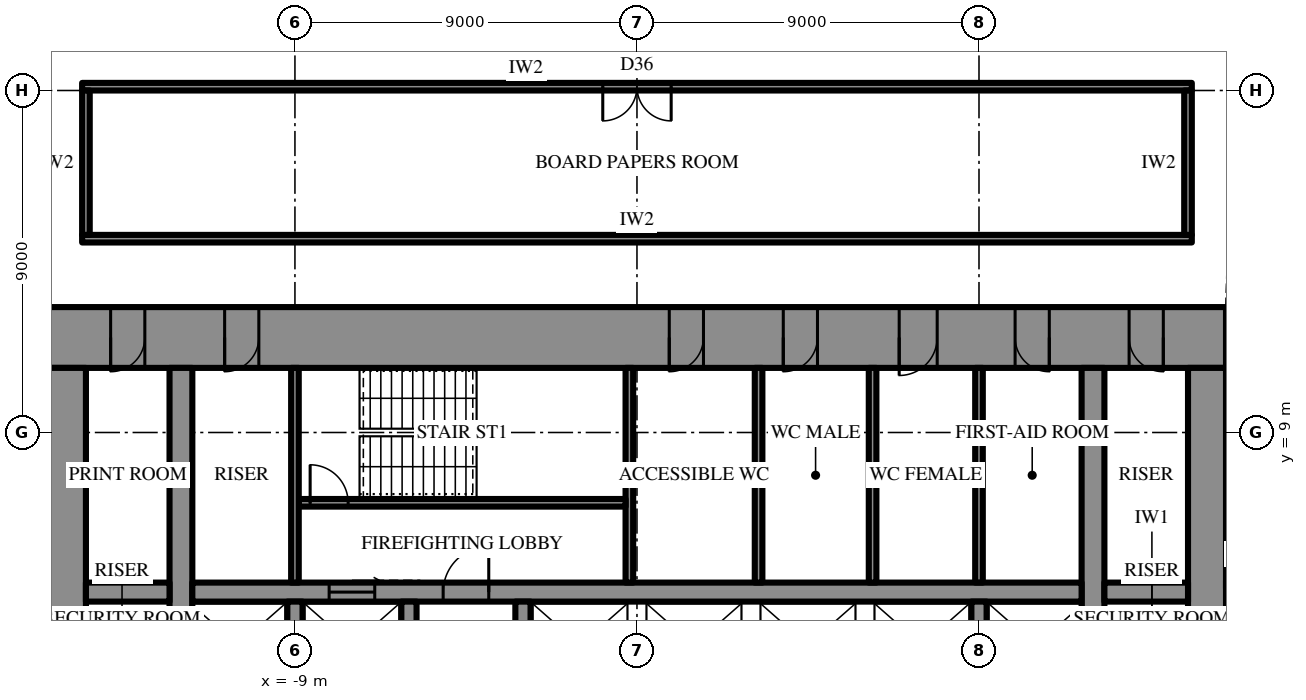
"""IFC4 building model, lengths in metres.
Left out: names, types, materials, properties, quantities, classifications, styles, units other than length and angle.
Written with IfcOpenShell. Run it as: python <this file> out.ifc"""

import sys

from ifc_helpers import new_model, si_unit, direction, frame, frame_2d, origin, place, context, subcontext, project, spatial, rectangle, extrude, element, fill, save


model = new_model("IFC4")
c1 = context("Model", 3, precision=1e-05, world=origin(), true_north=direction((0.0, 1.0)))
c2 = subcontext(c1, "Body", "Model", "MODEL_VIEW")
j1 = project(units=[si_unit("LENGTHUNIT", "METRE"), si_unit("PLANEANGLEUNIT", "RADIAN")], contexts=[c1])
p1 = place(None, origin())
s1 = spatial("IfcSite", under=j1, at=p1, CompositionType="ELEMENT")
p2 = place(p1, origin())
s2 = spatial("IfcBuilding", under=s1, at=p2, CompositionType="ELEMENT")
p3 = place(p2, frame((0.0, 0.0, 244.9)))
s3 = spatial("IfcBuildingStorey", under=s2, at=p3, CompositionType="ELEMENT", Elevation=244.9)
p4 = place(p3, frame((-15.5, 11.5, 0.0), z_axis=(0.0, 0.0, 1.0), x_axis=(1.0, 0.0, 0.0)))
e1 = element("IfcWall", 1, at=p4, inside=s3, PredefinedType="SHEAR", context=c2, shape_type="SweptSolid", body=[
    extrude(rectangle(XDim=31.0, YDim=1.6, at=frame_2d((15.5, 0.0))), origin(), (0.0, 0.0, 1.0), 4.2),
])
p5 = place(p4, frame((16.35, 0.0, 0.0)))
e2 = element("IfcOpeningElement", 2, at=p5, cuts=e1, PredefinedType="OPENING", context=c2, shape_type="SweptSolid", body=[
    extrude(rectangle(XDim=0.9, YDim=2.2, at=frame_2d((0.45, 1.1))), frame((0.0, 0.81, 0.0), z_axis=(0.0, -1.0, 0.0), x_axis=(1.0, 0.0, 0.0)), (0.0, 0.0, 1.0), 1.62),
])
p6 = place(p4, frame((19.35, 0.0, 0.0)))
e3 = element("IfcOpeningElement", 3, at=p6, cuts=e1, PredefinedType="OPENING", context=c2, shape_type="SweptSolid", body=[
    extrude(rectangle(XDim=0.9, YDim=2.2, at=frame_2d((0.45, 1.1))), frame((0.0, 0.81, 0.0), z_axis=(0.0, -1.0, 0.0), x_axis=(1.0, 0.0, 0.0)), (0.0, 0.0, 1.0), 1.62),
])
p7 = place(p4, frame((22.4, 0.0, 0.0)))
e4 = element("IfcOpeningElement", 4, at=p7, cuts=e1, PredefinedType="OPENING", context=c2, shape_type="SweptSolid", body=[
    extrude(rectangle(XDim=1.0, YDim=2.2, at=frame_2d((0.5, 1.1))), frame((0.0, 0.81, 0.0), z_axis=(0.0, -1.0, 0.0), x_axis=(1.0, 0.0, 0.0)), (0.0, 0.0, 1.0), 1.62),
])
p8 = place(p4, frame((1.65, 0.0, 0.0)))
e5 = element("IfcOpeningElement", 5, at=p8, cuts=e1, PredefinedType="OPENING", context=c2, shape_type="SweptSolid", body=[
    extrude(rectangle(XDim=0.9, YDim=2.2, at=frame_2d((0.45, 1.1))), frame((0.0, 0.81, 0.0), z_axis=(0.0, -1.0, 0.0), x_axis=(1.0, 0.0, 0.0)), (0.0, 0.0, 1.0), 1.62),
])
p9 = place(p4, frame((4.65, 0.0, 0.0)))
e6 = element("IfcOpeningElement", 6, at=p9, cuts=e1, PredefinedType="OPENING", context=c2, shape_type="SweptSolid", body=[
    extrude(rectangle(XDim=0.9, YDim=2.2, at=frame_2d((0.45, 1.1))), frame((0.0, 0.81, 0.0), z_axis=(0.0, -1.0, 0.0), x_axis=(1.0, 0.0, 0.0)), (0.0, 0.0, 1.0), 1.62),
])
p10 = place(p4, frame((25.45, 0.0, 0.0)))
e7 = element("IfcOpeningElement", 7, at=p10, cuts=e1, PredefinedType="OPENING", context=c2, shape_type="SweptSolid", body=[
    extrude(rectangle(XDim=0.9, YDim=2.2, at=frame_2d((0.45, 1.1))), frame((0.0, 0.81, 0.0), z_axis=(0.0, -1.0, 0.0), x_axis=(1.0, 0.0, 0.0)), (0.0, 0.0, 1.0), 1.62),
])
p11 = place(p4, frame((28.45, 0.0, 0.0)))
e8 = element("IfcOpeningElement", 8, at=p11, cuts=e1, PredefinedType="OPENING", context=c2, shape_type="SweptSolid", body=[
    extrude(rectangle(XDim=0.9, YDim=2.2, at=frame_2d((0.45, 1.1))), frame((0.0, 0.81, 0.0), z_axis=(0.0, -1.0, 0.0), x_axis=(1.0, 0.0, 0.0)), (0.0, 0.0, 1.0), 1.62),
])
p12 = place(p3, frame((15.0, -10.7, 0.0), z_axis=(0.0, 0.0, 1.0), x_axis=(0.0, 1.0, 0.0)))
e9 = element("IfcWall", 9, at=p12, inside=s3, PredefinedType="SHEAR", context=c2, shape_type="SweptSolid", body=[
    extrude(rectangle(XDim=21.4, YDim=1.0, at=frame_2d((10.7, 0.0))), origin(), (0.0, 0.0, 1.0), 4.2),
])
p13 = place(p12, frame((9.8, 0.0, 0.0)))
e10 = element("IfcOpeningElement", 10, at=p13, cuts=e9, PredefinedType="OPENING", context=c2, shape_type="SweptSolid", body=[
    extrude(rectangle(XDim=1.8, YDim=2.4, at=frame_2d((0.9, 1.2))), frame((0.0, 0.51, 0.0), z_axis=(0.0, -1.0, 0.0), x_axis=(1.0, 0.0, 0.0)), (0.0, 0.0, 1.0), 1.02),
])
p14 = place(p3, frame((-15.0, 10.7, 0.0), z_axis=(0.0, 0.0, 1.0), x_axis=(0.0, -1.0, 0.0)))
e11 = element("IfcWall", 11, at=p14, inside=s3, PredefinedType="SHEAR", context=c2, shape_type="SweptSolid", body=[
    extrude(rectangle(XDim=21.4, YDim=1.0, at=frame_2d((10.7, 0.0))), origin(), (0.0, 0.0, 1.0), 4.2),
])
p15 = place(p14, frame((9.8, 0.0, 0.0)))
e12 = element("IfcOpeningElement", 12, at=p15, cuts=e11, PredefinedType="OPENING", context=c2, shape_type="SweptSolid", body=[
    extrude(rectangle(XDim=1.8, YDim=2.4, at=frame_2d((0.9, 1.2))), frame((0.0, 0.51, 0.0), z_axis=(0.0, -1.0, 0.0), x_axis=(1.0, 0.0, 0.0)), (0.0, 0.0, 1.0), 1.02),
])
p16 = place(p3, frame((12.0, -10.7, 0.0), z_axis=(0.0, 0.0, 1.0), x_axis=(0.0, 1.0, 0.0)))
e13 = element("IfcWall", 13, at=p16, inside=s3, PredefinedType="SHEAR", context=c2, shape_type="SweptSolid", body=[
    extrude(rectangle(XDim=21.4, YDim=0.6, at=frame_2d((10.7, 0.0))), origin(), (0.0, 0.0, 1.0), 4.2),
])
p17 = place(p16, frame((9.8, 0.0, 0.0)))
e14 = element("IfcOpeningElement", 14, at=p17, cuts=e13, PredefinedType="OPENING", context=c2, shape_type="SweptSolid", body=[
    extrude(rectangle(XDim=1.8, YDim=2.4, at=frame_2d((0.9, 1.2))), frame((0.0, 0.31, 0.0), z_axis=(0.0, -1.0, 0.0), x_axis=(1.0, 0.0, 0.0)), (0.0, 0.0, 1.0), 0.62),
])
p18 = place(p3, frame((-12.0, -10.7, 0.0), z_axis=(0.0, 0.0, 1.0), x_axis=(0.0, 1.0, 0.0)))
e15 = element("IfcWall", 15, at=p18, inside=s3, PredefinedType="SHEAR", context=c2, shape_type="SweptSolid", body=[
    extrude(rectangle(XDim=21.4, YDim=0.6, at=frame_2d((10.7, 0.0))), origin(), (0.0, 0.0, 1.0), 4.2),
])
p19 = place(p18, frame((9.8, 0.0, 0.0)))
e16 = element("IfcOpeningElement", 16, at=p19, cuts=e15, PredefinedType="OPENING", context=c2, shape_type="SweptSolid", body=[
    extrude(rectangle(XDim=1.8, YDim=2.4, at=frame_2d((0.9, 1.2))), frame((0.0, 0.31, 0.0), z_axis=(0.0, -1.0, 0.0), x_axis=(1.0, 0.0, 0.0)), (0.0, 0.0, 1.0), 0.62),
])
p20 = place(p3, frame((-14.5, 4.8, 0.0), z_axis=(0.0, 0.0, 1.0), x_axis=(1.0, 0.0, 0.0)))
e17 = element("IfcWall", 17, at=p20, inside=s3, PredefinedType="SHEAR", context=c2, shape_type="SweptSolid", body=[
    extrude(rectangle(XDim=2.2, YDim=0.5, at=frame_2d((1.1, 0.0))), origin(), (0.0, 0.0, 1.0), 4.2),
])
p21 = place(p3, frame((-11.7, 4.8, 0.0), z_axis=(0.0, 0.0, 1.0), x_axis=(1.0, 0.0, 0.0)))
e18 = element("IfcWall", 18, at=p21, inside=s3, PredefinedType="SHEAR", context=c2, shape_type="SweptSolid", body=[
    extrude(rectangle(XDim=23.4, YDim=0.5, at=frame_2d((11.7, 0.0))), origin(), (0.0, 0.0, 1.0), 4.2),
])
p22 = place(p21, frame((6.6, 0.0, 0.0)))
e19 = element("IfcOpeningElement", 19, at=p22, cuts=e18, PredefinedType="OPENING", context=c2, shape_type="SweptSolid", body=[
    extrude(rectangle(XDim=1.2, YDim=2.2, at=frame_2d((0.6, 1.1))), frame((0.0, 0.26, 0.0), z_axis=(0.0, -1.0, 0.0), x_axis=(1.0, 0.0, 0.0)), (0.0, 0.0, 1.0), 0.52),
])
p23 = place(p21, frame((3.6, 0.0, 0.0)))
e20 = element("IfcOpeningElement", 20, at=p23, cuts=e18, PredefinedType="OPENING", context=c2, shape_type="SweptSolid", body=[
    extrude(rectangle(XDim=1.2, YDim=2.2, at=frame_2d((0.6, 1.1))), frame((0.0, 0.26, 0.0), z_axis=(0.0, -1.0, 0.0), x_axis=(1.0, 0.0, 0.0)), (0.0, 0.0, 1.0), 0.52),
])
p24 = place(p3, frame((12.3, 4.8, 0.0), z_axis=(0.0, 0.0, 1.0), x_axis=(1.0, 0.0, 0.0)))
e21 = element("IfcWall", 21, at=p24, inside=s3, PredefinedType="SHEAR", context=c2, shape_type="SweptSolid", body=[
    extrude(rectangle(XDim=2.2, YDim=0.5, at=frame_2d((1.1, 0.0))), origin(), (0.0, 0.0, 1.0), 4.2),
])
for number, where, z_axis, x_axis in (
    (22, (-9.0, 2.25, 0.0), (0.0, 0.0, 1.0), (0.0, 1.0, 0.0)),
    (23, (-6.0, 2.25, 0.0), (0.0, 0.0, 1.0), (0.0, 1.0, 0.0)),
    (24, (-3.0, 2.25, 0.0), (0.0, 0.0, 1.0), (0.0, 1.0, 0.0)),
    (25, (9.0, 2.25, 0.0), (0.0, 0.0, 1.0), (0.0, 1.0, 0.0)),
):
    element("IfcWall", number, at=place(p3, frame(where, z_axis=z_axis, x_axis=x_axis)), inside=s3, PredefinedType="SHEAR", context=c2, shape_type="SweptSolid", body=[
        extrude(rectangle(XDim=2.3, YDim=0.4, at=frame_2d((1.15, 0.0))), origin(), (0.0, 0.0, 1.0), 4.2),
    ])
p25 = place(p3, frame((-0.2, 5.05, 0.0), z_axis=(0.0, 0.0, 1.0), x_axis=(0.0, 1.0, 0.0)))
e26 = element("IfcWall", 26, at=p25, inside=s3, PredefinedType="SHEAR", context=c2, shape_type="SweptSolid", body=[
    extrude(rectangle(XDim=5.65, YDim=0.2, at=frame_2d((2.825, 0.0))), origin(), (0.0, 0.0, 1.0), 4.2),
])
p26 = place(p3, frame((-8.9, 7.15, 0.0), z_axis=(0.0, 0.0, 1.0), x_axis=(1.0, 0.0, 0.0)))
e27 = element("IfcWall", 27, at=p26, inside=s3, PredefinedType="SHEAR", context=c2, shape_type="SweptSolid", body=[
    extrude(rectangle(XDim=8.6, YDim=0.2, at=frame_2d((4.3, 0.0))), origin(), (0.0, 0.0, 1.0), 4.2),
])
p27 = place(p26, frame((0.3, 0.0, 0.0)))
e28 = element("IfcOpeningElement", 28, at=p27, cuts=e27, PredefinedType="OPENING", context=c2, shape_type="SweptSolid", body=[
    extrude(rectangle(XDim=1.0, YDim=2.2, at=frame_2d((0.5, 1.1))), frame((0.0, 0.11, 0.0), z_axis=(0.0, -1.0, 0.0), x_axis=(1.0, 0.0, 0.0)), (0.0, 0.0, 1.0), 0.22),
])
for number, where, z_axis, x_axis in (
    (29, (-9.0, 5.05, 0.0), (0.0, 0.0, 1.0), (0.0, 1.0, 0.0)),
    (30, (9.0, 5.05, 0.0), (0.0, 0.0, 1.0), (0.0, 1.0, 0.0)),
    (31, (3.2, 5.05, 0.0), (0.0, 0.0, 1.0), (0.0, 1.0, 0.0)),
    (32, (6.2, 5.05, 0.0), (0.0, 0.0, 1.0), (0.0, 1.0, 0.0)),
):
    element("IfcWall", number, at=place(p3, frame(where, z_axis=z_axis, x_axis=x_axis)), inside=s3, PredefinedType="PARTITIONING", context=c2, shape_type="SweptSolid", body=[
        extrude(rectangle(XDim=5.65, YDim=0.2, at=frame_2d((2.825, 0.0))), origin(), (0.0, 0.0, 1.0), 4.0),
    ])
p28 = place(p3, frame((-14.6, 14.1, 0.0), z_axis=(0.0, 0.0, 1.0), x_axis=(1.0, 0.0, 0.0)))
e33 = element("IfcWall", 33, at=p28, inside=s3, PredefinedType="PARTITIONING", context=c2, shape_type="SweptSolid", body=[
    extrude(rectangle(XDim=29.2, YDim=0.2, at=frame_2d((14.6, 0.0))), origin(), (0.0, 0.0, 1.0), 4.0),
])
p29 = place(p3, frame((-14.6, 18.1, 0.0), z_axis=(0.0, 0.0, 1.0), x_axis=(1.0, 0.0, 0.0)))
e34 = element("IfcWall", 34, at=p29, inside=s3, PredefinedType="PARTITIONING", context=c2, shape_type="SweptSolid", body=[
    extrude(rectangle(XDim=29.2, YDim=0.2, at=frame_2d((14.6, 0.0))), origin(), (0.0, 0.0, 1.0), 4.0),
])
p30 = place(p29, frame((13.7, 0.0, 0.0)))
e35 = element("IfcOpeningElement", 35, at=p30, cuts=e34, PredefinedType="OPENING", context=c2, shape_type="SweptSolid", body=[
    extrude(rectangle(XDim=1.8, YDim=2.4, at=frame_2d((0.9, 1.2))), frame((0.0, 0.11, 0.0), z_axis=(0.0, -1.0, 0.0), x_axis=(1.0, 0.0, 0.0)), (0.0, 0.0, 1.0), 0.22),
])
for number, where, z_axis, x_axis in (
    (36, (-14.5, 14.2, 0.0), (0.0, 0.0, 1.0), (0.0, 1.0, 0.0)),
    (37, (14.5, 14.2, 0.0), (0.0, 0.0, 1.0), (0.0, 1.0, 0.0)),
):
    element("IfcWall", number, at=place(p3, frame(where, z_axis=z_axis, x_axis=x_axis)), inside=s3, PredefinedType="PARTITIONING", context=c2, shape_type="SweptSolid", body=[
        extrude(rectangle(XDim=3.8, YDim=0.2, at=frame_2d((1.9, 0.0))), origin(), (0.0, 0.0, 1.0), 4.0),
    ])
p31 = place(p3, frame((15.5, 5.0, 0.0), z_axis=(0.0, 0.0, 1.0), x_axis=(1.0, 0.0, 0.0)))
e38 = element("IfcWall", 38, at=p31, inside=s3, PredefinedType="PARTITIONING", context=c2, shape_type="SweptSolid", body=[
    extrude(rectangle(XDim=2.3, YDim=0.2, at=frame_2d((1.15, 0.0))), origin(), (0.0, 0.0, 1.0), 4.0),
])
p32 = place(p31, frame((0.65, 0.0, 0.0)))
e39 = element("IfcOpeningElement", 39, at=p32, cuts=e38, PredefinedType="OPENING", context=c2, shape_type="SweptSolid", body=[
    extrude(rectangle(XDim=1.0, YDim=2.2, at=frame_2d((0.5, 1.1))), frame((0.0, 0.11, 0.0), z_axis=(0.0, -1.0, 0.0), x_axis=(1.0, 0.0, 0.0)), (0.0, 0.0, 1.0), 0.22),
])
p33 = place(p22, origin())
e40 = element("IfcDoor", 40, at=p33, inside=s3, OperationType="SINGLE_SWING_LEFT", PredefinedType="DOOR", context=c2, shape_type="SweptSolid", body=[
    extrude(rectangle(XDim=1.2, YDim=2.2, at=frame_2d((0.6, 1.1))), frame((0.0, 0.025, 0.0), z_axis=(0.0, -1.0, 0.0), x_axis=(1.0, 0.0, 0.0)), (0.0, 0.0, 1.0), 0.05),
])
fill(e19, e40)
p34 = place(p27, origin())
e41 = element("IfcDoor", 41, at=p34, inside=s3, OperationType="SINGLE_SWING_RIGHT", PredefinedType="DOOR", context=c2, shape_type="SweptSolid", body=[
    extrude(rectangle(XDim=1.0, YDim=2.2, at=frame_2d((0.5, 1.1))), frame((0.0, 0.025, 0.0), z_axis=(0.0, -1.0, 0.0), x_axis=(1.0, 0.0, 0.0)), (0.0, 0.0, 1.0), 0.05),
])
fill(e28, e41)
p35 = place(p5, frame((0.9, 0.0, 0.0), z_axis=(0.0, 0.0, 1.0), x_axis=(-1.0, 0.0, 0.0)))
e42 = element("IfcDoor", 42, at=p35, inside=s3, OperationType="SINGLE_SWING_LEFT", PredefinedType="DOOR", context=c2, shape_type="SweptSolid", body=[
    extrude(rectangle(XDim=0.9, YDim=2.2, at=frame_2d((0.45, 1.1))), frame((0.0, 0.025, 0.0), z_axis=(0.0, -1.0, 0.0), x_axis=(1.0, 0.0, 0.0)), (0.0, 0.0, 1.0), 0.05),
])
fill(e2, e42)
p36 = place(p6, frame((0.9, 0.0, 0.0), z_axis=(0.0, 0.0, 1.0), x_axis=(-1.0, 0.0, 0.0)))
e43 = element("IfcDoor", 43, at=p36, inside=s3, OperationType="SINGLE_SWING_LEFT", PredefinedType="DOOR", context=c2, shape_type="SweptSolid", body=[
    extrude(rectangle(XDim=0.9, YDim=2.2, at=frame_2d((0.45, 1.1))), frame((0.0, 0.025, 0.0), z_axis=(0.0, -1.0, 0.0), x_axis=(1.0, 0.0, 0.0)), (0.0, 0.0, 1.0), 0.05),
])
fill(e3, e43)
p37 = place(p7, frame((1.0, 0.0, 0.0), z_axis=(0.0, 0.0, 1.0), x_axis=(-1.0, 0.0, 0.0)))
e44 = element("IfcDoor", 44, at=p37, inside=s3, OperationType="SINGLE_SWING_LEFT", PredefinedType="DOOR", context=c2, shape_type="SweptSolid", body=[
    extrude(rectangle(XDim=1.0, YDim=2.2, at=frame_2d((0.5, 1.1))), frame((0.0, 0.025, 0.0), z_axis=(0.0, -1.0, 0.0), x_axis=(1.0, 0.0, 0.0)), (0.0, 0.0, 1.0), 0.05),
])
fill(e4, e44)
p38 = place(p8, frame((0.9, 0.0, 0.0), z_axis=(0.0, 0.0, 1.0), x_axis=(-1.0, 0.0, 0.0)))
e45 = element("IfcDoor", 45, at=p38, inside=s3, OperationType="SINGLE_SWING_LEFT", PredefinedType="DOOR", context=c2, shape_type="SweptSolid", body=[
    extrude(rectangle(XDim=0.9, YDim=2.2, at=frame_2d((0.45, 1.1))), frame((0.0, 0.025, 0.0), z_axis=(0.0, -1.0, 0.0), x_axis=(1.0, 0.0, 0.0)), (0.0, 0.0, 1.0), 0.05),
])
fill(e5, e45)
p39 = place(p9, frame((0.9, 0.0, 0.0), z_axis=(0.0, 0.0, 1.0), x_axis=(-1.0, 0.0, 0.0)))
e46 = element("IfcDoor", 46, at=p39, inside=s3, OperationType="SINGLE_SWING_LEFT", PredefinedType="DOOR", context=c2, shape_type="SweptSolid", body=[
    extrude(rectangle(XDim=0.9, YDim=2.2, at=frame_2d((0.45, 1.1))), frame((0.0, 0.025, 0.0), z_axis=(0.0, -1.0, 0.0), x_axis=(1.0, 0.0, 0.0)), (0.0, 0.0, 1.0), 0.05),
])
fill(e6, e46)
p40 = place(p10, frame((0.9, 0.0, 0.0), z_axis=(0.0, 0.0, 1.0), x_axis=(-1.0, 0.0, 0.0)))
e47 = element("IfcDoor", 47, at=p40, inside=s3, OperationType="SINGLE_SWING_RIGHT", PredefinedType="DOOR", context=c2, shape_type="SweptSolid", body=[
    extrude(rectangle(XDim=0.9, YDim=2.2, at=frame_2d((0.45, 1.1))), frame((0.0, 0.025, 0.0), z_axis=(0.0, -1.0, 0.0), x_axis=(1.0, 0.0, 0.0)), (0.0, 0.0, 1.0), 0.05),
])
fill(e7, e47)
p41 = place(p11, frame((0.9, 0.0, 0.0), z_axis=(0.0, 0.0, 1.0), x_axis=(-1.0, 0.0, 0.0)))
e48 = element("IfcDoor", 48, at=p41, inside=s3, OperationType="SINGLE_SWING_RIGHT", PredefinedType="DOOR", context=c2, shape_type="SweptSolid", body=[
    extrude(rectangle(XDim=0.9, YDim=2.2, at=frame_2d((0.45, 1.1))), frame((0.0, 0.025, 0.0), z_axis=(0.0, -1.0, 0.0), x_axis=(1.0, 0.0, 0.0)), (0.0, 0.0, 1.0), 0.05),
])
fill(e8, e48)
p42 = place(p23, origin())
e49 = element("IfcDoor", 49, at=p42, inside=s3, OperationType="SLIDING_TO_LEFT", PredefinedType="DOOR", context=c2, shape_type="SweptSolid", body=[
    extrude(rectangle(XDim=1.2, YDim=2.2, at=frame_2d((0.6, 1.1))), frame((0.0, 0.025, 0.0), z_axis=(0.0, -1.0, 0.0), x_axis=(1.0, 0.0, 0.0)), (0.0, 0.0, 1.0), 0.05),
])
fill(e20, e49)
p43 = place(p30, frame((1.8, 0.0, 0.0), z_axis=(0.0, 0.0, 1.0), x_axis=(-1.0, 0.0, 0.0)))
e50 = element("IfcDoor", 50, at=p43, inside=s3, OperationType="DOUBLE_DOOR_SINGLE_SWING", PredefinedType="DOOR", context=c2, shape_type="SweptSolid", body=[
    extrude(rectangle(XDim=1.8, YDim=2.4, at=frame_2d((0.9, 1.2))), frame((0.0, 0.025, 0.0), z_axis=(0.0, -1.0, 0.0), x_axis=(1.0, 0.0, 0.0)), (0.0, 0.0, 1.0), 0.05),
])
fill(e35, e50)
save(model, sys.argv[1])
